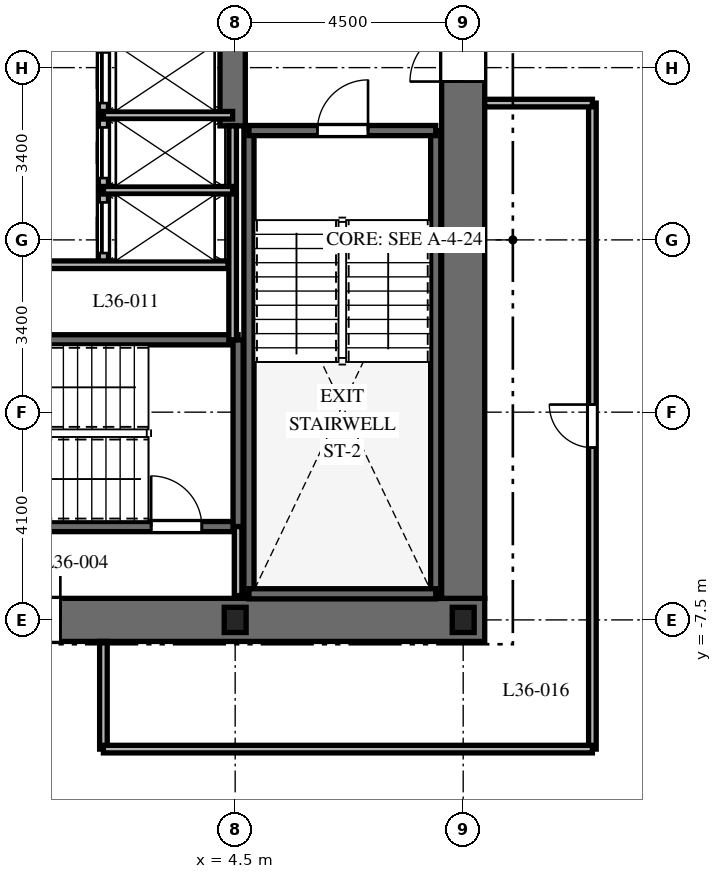
"""IFC4 building model, lengths in metres.
Left out: names, types, materials, properties, quantities, classifications, styles, units other than length and angle.
Written with IfcOpenShell. Run it as: python <this file> out.ifc"""

import sys

from ifc_helpers import new_model, si_unit, direction, frame, frame_2d, origin, origin_2d, place, context, subcontext, project, spatial, rectangle, i_section, extrude, element, fill, save


model = new_model("IFC4")
c1 = context("Model", 3, precision=1e-05, world=origin(), true_north=direction((0.0, 1.0)))
c2 = subcontext(c1, "Body", "Model", "MODEL_VIEW")
j1 = project(units=[si_unit("LENGTHUNIT", "METRE"), si_unit("PLANEANGLEUNIT", "RADIAN")], contexts=[c1])
p1 = place(None, origin())
s1 = spatial("IfcSite", under=j1, at=p1, CompositionType="ELEMENT")
p2 = place(p1, origin())
s2 = spatial("IfcBuilding", under=s1, at=p2, CompositionType="ELEMENT")
p3 = place(p2, frame((0.0, 0.0, 148.0)))
s3 = spatial("IfcBuildingStorey", under=s2, at=p3, CompositionType="ELEMENT", Elevation=148.0)
p4 = place(p3, frame((-9.425, -7.5, 0.0), z_axis=(0.0, 0.0, 1.0), x_axis=(1.0, 0.0, 0.0)))
e1 = element("IfcWall", 1, at=p4, inside=s3, PredefinedType="SHEAR", context=c2, shape_type="SweptSolid", body=[
    extrude(rectangle(XDim=18.85, YDim=0.85, at=frame_2d((9.425, 0.0))), origin(), (0.0, 0.0, 1.0), 3.7),
])
p5 = place(p4, frame((9.475, 0.0, 0.0)))
e2 = element("IfcOpeningElement", 2, at=p5, cuts=e1, PredefinedType="OPENING", context=c2, shape_type="SweptSolid", body=[
    extrude(rectangle(XDim=1.0, YDim=2.15, at=frame_2d((0.5, 1.075))), frame((0.0, 0.435, 0.0), z_axis=(0.0, -1.0, 0.0), x_axis=(1.0, 0.0, 0.0)), (0.0, 0.0, 1.0), 0.87),
])
p6 = place(p3, frame((9.0, -7.075, 0.0), z_axis=(0.0, 0.0, 1.0), x_axis=(0.0, 1.0, 0.0)))
e3 = element("IfcWall", 3, at=p6, inside=s3, PredefinedType="SHEAR", context=c2, shape_type="SweptSolid", body=[
    extrude(rectangle(XDim=14.15, YDim=0.85, at=frame_2d((7.075, 0.0))), origin(), (0.0, 0.0, 1.0), 3.7),
])
p7 = place(p6, frame((10.2, 0.0, 0.0)))
e4 = element("IfcOpeningElement", 4, at=p7, cuts=e3, PredefinedType="OPENING", context=c2, shape_type="SweptSolid", body=[
    extrude(rectangle(XDim=1.05, YDim=2.15, at=frame_2d((0.525, 1.075))), frame((0.0, 0.435, 0.0), z_axis=(0.0, -1.0, 0.0), x_axis=(1.0, 0.0, 0.0)), (0.0, 0.0, 1.0), 0.87),
])
p8 = place(p3, frame((4.45, 2.25, 0.0), z_axis=(0.0, 0.0, 1.0), x_axis=(0.0, 1.0, 0.0)))
e5 = element("IfcWall", 5, at=p8, inside=s3, PredefinedType="SHEAR", context=c2, shape_type="SweptSolid", body=[
    extrude(rectangle(XDim=4.825, YDim=0.5, at=frame_2d((2.413, 0.0))), origin(), (0.0, 0.0, 1.0), 3.7),
])
for number, where, z_axis, x_axis in (
    (6, (4.772, -6.985, 0.0), (0.0, 0.0, 1.0), (0.0, 1.0, 0.0)),
    (7, (8.458, -6.985, 0.0), (0.0, 0.0, 1.0), (0.0, 1.0, 0.0)),
):
    element("IfcWall", number, at=place(p3, frame(where, z_axis=z_axis, x_axis=x_axis)), inside=s3, PredefinedType="SHEAR", context=c2, shape_type="SweptSolid", body=[
        extrude(rectangle(XDim=9.143, YDim=0.2, at=frame_2d((4.572, 0.0))), origin(), (0.0, 0.0, 1.0), 3.7),
    ])
p9 = place(p3, frame((4.772, -6.985, 0.0), z_axis=(0.0, 0.0, 1.0), x_axis=(1.0, 0.0, 0.0)))
e8 = element("IfcWall", 8, at=p9, inside=s3, PredefinedType="SHEAR", context=c2, shape_type="SweptSolid", body=[
    extrude(rectangle(XDim=3.686, YDim=0.2, at=frame_2d((1.843, 0.0))), origin(), (0.0, 0.0, 1.0), 3.7),
])
p10 = place(p3, frame((4.772, 2.158, 0.0), z_axis=(0.0, 0.0, 1.0), x_axis=(1.0, 0.0, 0.0)))
e9 = element("IfcWall", 9, at=p10, inside=s3, PredefinedType="SHEAR", context=c2, shape_type="SweptSolid", body=[
    extrude(rectangle(XDim=3.686, YDim=0.2, at=frame_2d((1.843, 0.0))), origin(), (0.0, 0.0, 1.0), 3.7),
])
p11 = place(p10, frame((1.35, 0.0, 0.0)))
e10 = element("IfcOpeningElement", 10, at=p11, cuts=e9, PredefinedType="OPENING", context=c2, shape_type="SweptSolid", body=[
    extrude(rectangle(XDim=1.0, YDim=2.15, at=frame_2d((0.5, 1.075))), frame((0.0, 0.11, 0.0), z_axis=(0.0, -1.0, 0.0), x_axis=(1.0, 0.0, 0.0)), (0.0, 0.0, 1.0), 0.22),
])
p12 = place(p3, frame((-4.608, -5.658, 0.0), z_axis=(0.0, 0.0, 1.0), x_axis=(1.0, 0.0, 0.0)))
e11 = element("IfcWall", 11, at=p12, inside=s3, PredefinedType="SHEAR", context=c2, shape_type="SweptSolid", body=[
    extrude(rectangle(XDim=9.166, YDim=0.2, at=frame_2d((4.583, 0.0))), origin(), (0.0, 0.0, 1.0), 3.7),
])
p13 = place(p12, frame((7.45, 0.0, 0.0)))
e12 = element("IfcOpeningElement", 12, at=p13, cuts=e11, PredefinedType="OPENING", context=c2, shape_type="SweptSolid", body=[
    extrude(rectangle(XDim=1.0, YDim=2.15, at=frame_2d((0.5, 1.075))), frame((0.0, 0.11, 0.0), z_axis=(0.0, -1.0, 0.0), x_axis=(1.0, 0.0, 0.0)), (0.0, 0.0, 1.0), 0.22),
])
p14 = place(p3, frame((-4.608, -1.972, 0.0), z_axis=(0.0, 0.0, 1.0), x_axis=(1.0, 0.0, 0.0)))
e13 = element("IfcWall", 13, at=p14, inside=s3, PredefinedType="SHEAR", context=c2, shape_type="SweptSolid", body=[
    extrude(rectangle(XDim=9.166, YDim=0.2, at=frame_2d((4.583, 0.0))), origin(), (0.0, 0.0, 1.0), 3.7),
])
p15 = place(p3, frame((4.558, -5.658, 0.0), z_axis=(0.0, 0.0, 1.0), x_axis=(0.0, 1.0, 0.0)))
e14 = element("IfcWall", 14, at=p15, inside=s3, PredefinedType="SHEAR", context=c2, shape_type="SweptSolid", body=[
    extrude(rectangle(XDim=3.686, YDim=0.2, at=frame_2d((1.843, 0.0))), origin(), (0.0, 0.0, 1.0), 3.7),
])
for number, where, z_axis, x_axis in (
    (15, (4.5, -7.5, 0.0), (0.0, 0.0, 1.0), (1.0, 0.0, 0.0)),
    (16, (9.0, -7.5, 0.0), (0.0, 0.0, 1.0), (1.0, 0.0, 0.0)),
):
    element("IfcColumn", number, at=place(p3, frame(where, z_axis=z_axis, x_axis=x_axis)), inside=s3, PredefinedType="COLUMN", context=c2, shape_type="SweptSolid", body=[
        extrude(i_section(OverallWidth=0.432, OverallDepth=0.498, WebThickness=0.056, FlangeThickness=0.089, at=origin_2d()), origin(), (0.0, 0.0, 1.0), 3.7),
    ])
p16 = place(p3, frame((4.558, -7.02, 0.0), z_axis=(0.0, 0.0, 1.0), x_axis=(0.0, 1.0, 0.0)))
e17 = element("IfcWall", 17, at=p16, inside=s3, PredefinedType="PARTITIONING", context=c2, shape_type="SweptSolid", body=[
    extrude(rectangle(XDim=1.362, YDim=0.15, at=frame_2d((0.681, 0.0))), origin(), (0.0, 0.0, 1.0), 3.4),
])
p17 = place(p3, frame((4.45, -1.972, 0.0), z_axis=(0.0, 0.0, 1.0), x_axis=(0.0, 1.0, 0.0)))
e18 = element("IfcWall", 18, at=p17, inside=s3, PredefinedType="PARTITIONING", context=c2, shape_type="SweptSolid", body=[
    extrude(rectangle(XDim=4.222, YDim=0.15, at=frame_2d((2.111, 0.0))), origin(), (0.0, 0.0, 1.0), 3.4),
])
p18 = place(p3, frame((1.9, -0.5, 0.0), z_axis=(0.0, 0.0, 1.0), x_axis=(0.0, 1.0, 0.0)))
e19 = element("IfcWall", 19, at=p18, inside=s3, PredefinedType="PARTITIONING", context=c2, shape_type="SweptSolid", body=[
    extrude(rectangle(XDim=4.44, YDim=0.2, at=frame_2d((2.22, 0.0))), origin(), (0.0, 0.0, 1.0), 3.4),
])
p19 = place(p18, frame((0.24, 0.0, 0.0)))
e20 = element("IfcOpeningElement", 20, at=p19, cuts=e19, PredefinedType="OPENING", context=c2, shape_type="SweptSolid", body=[
    extrude(rectangle(XDim=1.0, YDim=2.2, at=frame_2d((0.5, 1.1))), frame((0.0, 0.11, 0.0), z_axis=(0.0, -1.0, 0.0), x_axis=(1.0, 0.0, 0.0)), (0.0, 0.0, 1.0), 0.22),
])
p20 = place(p18, frame((1.72, 0.0, 0.0)))
e21 = element("IfcOpeningElement", 21, at=p20, cuts=e19, PredefinedType="OPENING", context=c2, shape_type="SweptSolid", body=[
    extrude(rectangle(XDim=1.0, YDim=2.2, at=frame_2d((0.5, 1.1))), frame((0.0, 0.11, 0.0), z_axis=(0.0, -1.0, 0.0), x_axis=(1.0, 0.0, 0.0)), (0.0, 0.0, 1.0), 0.22),
])
p21 = place(p18, frame((3.2, 0.0, 0.0)))
e22 = element("IfcOpeningElement", 22, at=p21, cuts=e19, PredefinedType="OPENING", context=c2, shape_type="SweptSolid", body=[
    extrude(rectangle(XDim=1.0, YDim=2.2, at=frame_2d((0.5, 1.1))), frame((0.0, 0.11, 0.0), z_axis=(0.0, -1.0, 0.0), x_axis=(1.0, 0.0, 0.0)), (0.0, 0.0, 1.0), 0.22),
])
for number, where, z_axis, x_axis in (
    (23, (1.9, 0.98, 0.0), (0.0, 0.0, 1.0), (1.0, 0.0, 0.0)),
    (24, (1.9, 2.46, 0.0), (0.0, 0.0, 1.0), (1.0, 0.0, 0.0)),
):
    element("IfcWall", number, at=place(p3, frame(where, z_axis=z_axis, x_axis=x_axis)), inside=s3, PredefinedType="PARTITIONING", context=c2, shape_type="SweptSolid", body=[
        extrude(rectangle(XDim=2.55, YDim=0.15, at=frame_2d((1.275, 0.0))), origin(), (0.0, 0.0, 1.0), 3.4),
    ])
p22 = place(p3, frame((-4.36, -0.49, 0.0), z_axis=(0.0, 0.0, 1.0), x_axis=(1.0, 0.0, 0.0)))
e25 = element("IfcWall", 25, at=p22, inside=s3, PredefinedType="PARTITIONING", context=c2, shape_type="SweptSolid", body=[
    extrude(rectangle(XDim=8.72, YDim=0.15, at=frame_2d((4.36, 0.0))), origin(), (0.0, 0.0, 1.0), 3.4),
])
p23 = place(p22, frame((3.86, 0.0, 0.0)))
e26 = element("IfcOpeningElement", 26, at=p23, cuts=e25, PredefinedType="OPENING", context=c2, shape_type="SweptSolid", body=[
    extrude(rectangle(XDim=0.9, YDim=2.03, at=frame_2d((0.45, 1.015))), frame((0.0, 0.085, 0.0), z_axis=(0.0, -1.0, 0.0), x_axis=(1.0, 0.0, 0.0)), (0.0, 0.0, 1.0), 0.17),
])
p24 = place(p3, frame((11.55, -10.05, 0.0), z_axis=(0.0, 0.0, 1.0), x_axis=(0.0, 1.0, 0.0)))
e27 = element("IfcWall", 27, at=p24, inside=s3, PredefinedType="PARTITIONING", context=c2, shape_type="SweptSolid", body=[
    extrude(rectangle(XDim=12.75, YDim=0.15, at=frame_2d((6.375, 0.0))), origin(), (0.0, 0.0, 1.0), 2.84),
])
p25 = place(p24, frame((5.95, 0.0, 0.0)))
e28 = element("IfcOpeningElement", 28, at=p25, cuts=e27, PredefinedType="OPENING", context=c2, shape_type="SweptSolid", body=[
    extrude(rectangle(XDim=0.85, YDim=2.03, at=frame_2d((0.425, 1.015))), frame((0.0, 0.085, 0.0), z_axis=(0.0, -1.0, 0.0), x_axis=(1.0, 0.0, 0.0)), (0.0, 0.0, 1.0), 0.17),
])
for number, where, z_axis, x_axis in (
    (29, (11.55, 2.7, 0.0), (0.0, 0.0, 1.0), (-1.0, 0.0, 0.0)),
    (30, (1.9, -7.925, 0.0), (0.0, 0.0, 1.0), (0.0, -1.0, 0.0)),
):
    element("IfcWall", number, at=place(p3, frame(where, z_axis=z_axis, x_axis=x_axis)), inside=s3, PredefinedType="PARTITIONING", context=c2, shape_type="SweptSolid", body=[
        extrude(rectangle(XDim=2.125, YDim=0.15, at=frame_2d((1.062, 0.0))), origin(), (0.0, 0.0, 1.0), 3.4),
    ])
p26 = place(p3, frame((1.9, -10.05, 0.0), z_axis=(0.0, 0.0, 1.0), x_axis=(1.0, 0.0, 0.0)))
e31 = element("IfcWall", 31, at=p26, inside=s3, PredefinedType="PARTITIONING", context=c2, shape_type="SweptSolid", body=[
    extrude(rectangle(XDim=9.65, YDim=0.15, at=frame_2d((4.825, 0.0))), origin(), (0.0, 0.0, 1.0), 2.84),
])
p27 = place(p11, origin())
e32 = element("IfcDoor", 32, at=p27, inside=s3, OperationType="SINGLE_SWING_RIGHT", PredefinedType="DOOR", context=c2, shape_type="SweptSolid", body=[
    extrude(rectangle(XDim=1.0, YDim=2.15, at=frame_2d((0.5, 1.075))), frame((0.0, 0.025, 0.0), z_axis=(0.0, -1.0, 0.0), x_axis=(1.0, 0.0, 0.0)), (0.0, 0.0, 1.0), 0.05),
])
fill(e10, e32)
p28 = place(p13, origin())
e33 = element("IfcDoor", 33, at=p28, inside=s3, OperationType="SINGLE_SWING_LEFT", PredefinedType="DOOR", context=c2, shape_type="SweptSolid", body=[
    extrude(rectangle(XDim=1.0, YDim=2.15, at=frame_2d((0.5, 1.075))), frame((0.0, 0.025, 0.0), z_axis=(0.0, -1.0, 0.0), x_axis=(1.0, 0.0, 0.0)), (0.0, 0.0, 1.0), 0.05),
])
fill(e12, e33)
p29 = place(p5, origin())
e34 = element("IfcDoor", 34, at=p29, inside=s3, OperationType="SINGLE_SWING_RIGHT", PredefinedType="DOOR", context=c2, shape_type="SweptSolid", body=[
    extrude(rectangle(XDim=1.0, YDim=2.15, at=frame_2d((0.5, 1.075))), frame((0.0, 0.025, 0.0), z_axis=(0.0, -1.0, 0.0), x_axis=(1.0, 0.0, 0.0)), (0.0, 0.0, 1.0), 0.05),
])
fill(e2, e34)
p30 = place(p7, origin())
e35 = element("IfcDoor", 35, at=p30, inside=s3, OperationType="SINGLE_SWING_LEFT", PredefinedType="DOOR", context=c2, shape_type="SweptSolid", body=[
    extrude(rectangle(XDim=1.05, YDim=2.15, at=frame_2d((0.525, 1.075))), frame((0.0, 0.025, 0.0), z_axis=(0.0, -1.0, 0.0), x_axis=(1.0, 0.0, 0.0)), (0.0, 0.0, 1.0), 0.05),
])
fill(e4, e35)
p31 = place(p19, origin())
e36 = element("IfcDoor", 36, at=p31, inside=s3, OperationType="SLIDING_TO_RIGHT", PredefinedType="DOOR", context=c2, shape_type="SweptSolid", body=[
    extrude(rectangle(XDim=1.0, YDim=2.2, at=frame_2d((0.5, 1.1))), frame((0.0, 0.025, 0.0), z_axis=(0.0, -1.0, 0.0), x_axis=(1.0, 0.0, 0.0)), (0.0, 0.0, 1.0), 0.05),
])
fill(e20, e36)
p32 = place(p20, origin())
e37 = element("IfcDoor", 37, at=p32, inside=s3, OperationType="SLIDING_TO_RIGHT", PredefinedType="DOOR", context=c2, shape_type="SweptSolid", body=[
    extrude(rectangle(XDim=1.0, YDim=2.2, at=frame_2d((0.5, 1.1))), frame((0.0, 0.025, 0.0), z_axis=(0.0, -1.0, 0.0), x_axis=(1.0, 0.0, 0.0)), (0.0, 0.0, 1.0), 0.05),
])
fill(e21, e37)
p33 = place(p21, origin())
e38 = element("IfcDoor", 38, at=p33, inside=s3, OperationType="SLIDING_TO_RIGHT", PredefinedType="DOOR", context=c2, shape_type="SweptSolid", body=[
    extrude(rectangle(XDim=1.0, YDim=2.2, at=frame_2d((0.5, 1.1))), frame((0.0, 0.025, 0.0), z_axis=(0.0, -1.0, 0.0), x_axis=(1.0, 0.0, 0.0)), (0.0, 0.0, 1.0), 0.05),
])
fill(e22, e38)
p34 = place(p25, origin())
e39 = element("IfcDoor", 39, at=p34, inside=s3, OperationType="SINGLE_SWING_RIGHT", PredefinedType="DOOR", context=c2, shape_type="SweptSolid", body=[
    extrude(rectangle(XDim=0.85, YDim=2.03, at=frame_2d((0.425, 1.015))), frame((0.0, 0.025, 0.0), z_axis=(0.0, -1.0, 0.0), x_axis=(1.0, 0.0, 0.0)), (0.0, 0.0, 1.0), 0.05),
])
fill(e28, e39)
save(model, sys.argv[1])
